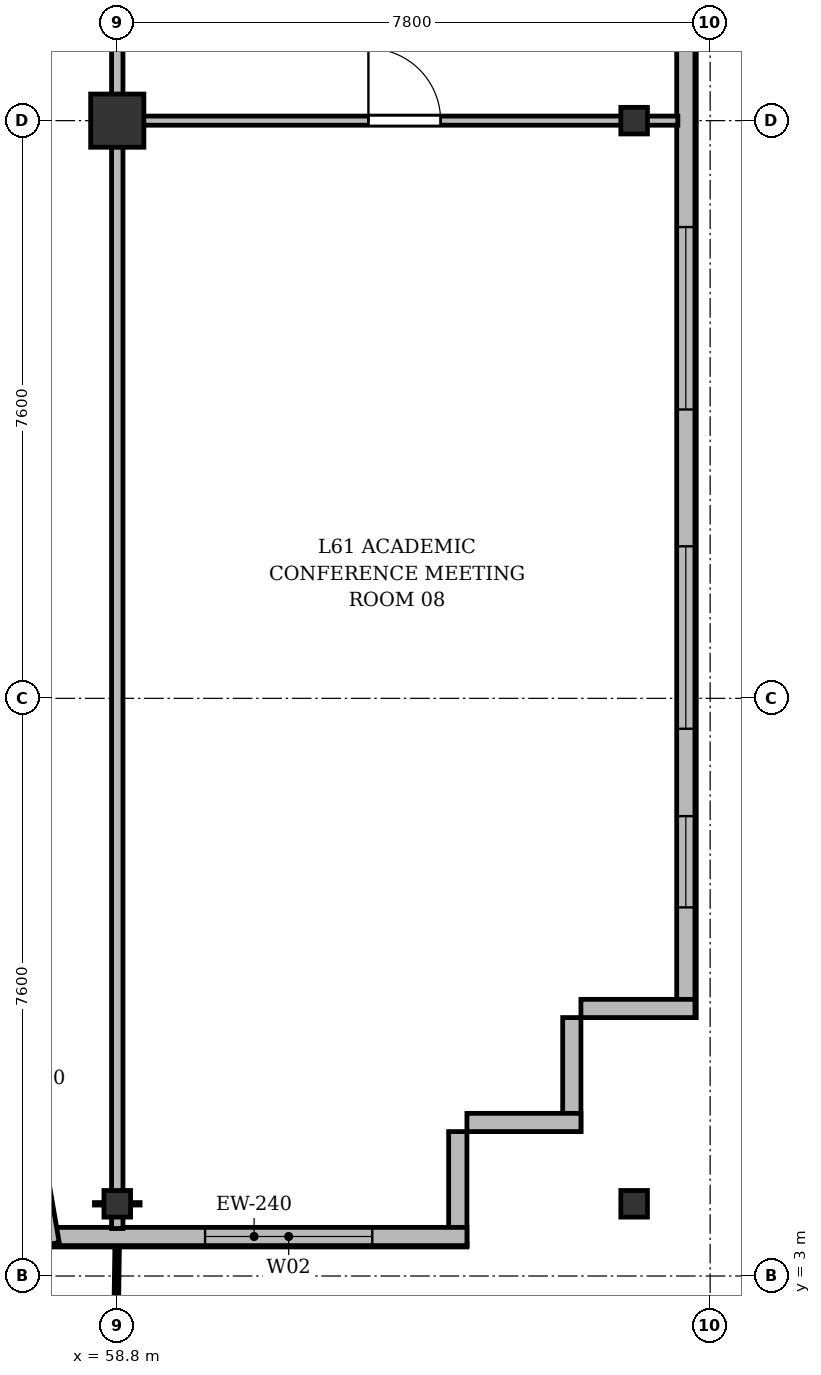
"""IFC4 building model, lengths in metres.
Left out: names, types, materials, properties, quantities, classifications, styles, units other than length and angle.
Written with IfcOpenShell. Run it as: python <this file> out.ifc"""

import sys

from ifc_helpers import new_model, si_unit, direction, frame, frame_2d, origin, origin_2d, place, context, subcontext, project, spatial, rectangle, i_section, extrude, source, transform, mapped, element, fill, save


model = new_model("IFC4")
c1 = context("Model", 3, precision=1e-05, world=origin(), true_north=direction((0.0, 1.0)))
c2 = subcontext(c1, "Body", "Model", "MODEL_VIEW")
j1 = project(units=[si_unit("LENGTHUNIT", "METRE"), si_unit("PLANEANGLEUNIT", "RADIAN")], contexts=[c1])
p1 = place(None, origin())
s1 = spatial("IfcSite", under=j1, at=p1, CompositionType="ELEMENT")
p2 = place(p1, origin())
s2 = spatial("IfcBuilding", under=s1, at=p2, CompositionType="ELEMENT")
p3 = place(p2, frame((0.0, 0.0, 233.7)))
s3 = spatial("IfcBuildingStorey", under=s2, at=p3, CompositionType="ELEMENT", Elevation=233.7)
m1 = source(origin(), c2, "Body", "SweptSolid", [
    extrude(i_section(OverallWidth=0.35, OverallDepth=0.35, WebThickness=0.018, FlangeThickness=0.028, at=origin_2d()), origin(), (0.0, 0.0, 1.0), 3.6),
])
p4 = place(p3, frame((58.8, 3.95, 0.0), z_axis=(0.0, 0.0, 1.0), x_axis=(1.0, 0.0, 0.0)))
e1 = element("IfcColumn", 1, at=p4, inside=s3, PredefinedType="COLUMN", context=c2, shape_type="MappedRepresentation", body=[
    mapped(m1, transform((0.0, 0.0, 0.0), x_axis=(1.0, 0.0, 0.0), y_axis=(0.0, 1.0, 0.0), z_axis=(0.0, 0.0, 1.0), scale=1.0)),
])
m2 = source(origin(), c2, "Body", "SweptSolid", [
    extrude(rectangle(XDim=0.7, YDim=0.7, at=origin_2d()), origin(), (0.0, 0.0, 1.0), 3.6),
])
p5 = place(p3, frame((58.8, 18.2, 0.0), z_axis=(0.0, 0.0, 1.0), x_axis=(1.0, 0.0, 0.0)))
e2 = element("IfcColumn", 2, at=p5, inside=s3, PredefinedType="COLUMN", context=c2, shape_type="MappedRepresentation", body=[
    mapped(m2, transform((0.0, 0.0, 0.0), x_axis=(1.0, 0.0, 0.0), y_axis=(0.0, 1.0, 0.0), z_axis=(0.0, 0.0, 1.0), scale=1.0)),
])
for number, where, z_axis, x_axis in (
    (3, (65.6, 3.95, 0.0), (0.0, 0.0, 1.0), (1.0, 0.0, 0.0)),
    (4, (65.6, 18.2, 0.0), (0.0, 0.0, 1.0), (1.0, 0.0, 0.0)),
):
    element("IfcColumn", number, at=place(p3, frame(where, z_axis=z_axis, x_axis=x_axis)), inside=s3, PredefinedType="COLUMN", context=c2, shape_type="MappedRepresentation", body=[
        mapped(m1, transform((0.0, 0.0, 0.0), x_axis=(1.0, 0.0, 0.0), y_axis=(0.0, 1.0, 0.0), z_axis=(0.0, 0.0, 1.0), scale=1.0)),
    ])
p6 = place(p3, frame((66.28, 45.5, 0.0), z_axis=(0.0, 0.0, 1.0), x_axis=(0.0, -1.0, 0.0)))
e5 = element("IfcWall", 5, at=p6, inside=s3, PredefinedType="SOLIDWALL", context=c2, shape_type="SweptSolid", body=[
    extrude(rectangle(XDim=39.1, YDim=0.24, at=frame_2d((19.55, 0.0))), origin(), (0.0, 0.0, 1.0), 3.36),
])
p7 = place(p6, frame((36.45, 0.0, 0.92)))
e6 = element("IfcOpeningElement", 6, at=p7, cuts=e5, PredefinedType="OPENING", context=c2, shape_type="SweptSolid", body=[
    extrude(rectangle(XDim=1.2, YDim=1.65, at=frame_2d((0.6, 0.825))), frame((0.0, 0.13, 0.0), z_axis=(0.0, -1.0, 0.0), x_axis=(1.0, 0.0, 0.0)), (0.0, 0.0, 1.0), 0.26),
])
p8 = place(p6, frame((32.9, 0.0, 0.92)))
e7 = element("IfcOpeningElement", 7, at=p8, cuts=e5, PredefinedType="OPENING", context=c2, shape_type="SweptSolid", body=[
    extrude(rectangle(XDim=2.4, YDim=2.1, at=frame_2d((1.2, 1.05))), frame((0.0, 0.13, 0.0), z_axis=(0.0, -1.0, 0.0), x_axis=(1.0, 0.0, 0.0)), (0.0, 0.0, 1.0), 0.26),
])
p9 = place(p6, frame((28.7, 0.0, 0.92)))
e8 = element("IfcOpeningElement", 8, at=p9, cuts=e5, PredefinedType="OPENING", context=c2, shape_type="SweptSolid", body=[
    extrude(rectangle(XDim=2.4, YDim=2.1, at=frame_2d((1.2, 1.05))), frame((0.0, 0.13, 0.0), z_axis=(0.0, -1.0, 0.0), x_axis=(1.0, 0.0, 0.0)), (0.0, 0.0, 1.0), 0.26),
])
p10 = place(p6, frame((21.5, 0.0, 0.92)))
e9 = element("IfcOpeningElement", 9, at=p10, cuts=e5, PredefinedType="OPENING", context=c2, shape_type="SweptSolid", body=[
    extrude(rectangle(XDim=2.4, YDim=2.1, at=frame_2d((1.2, 1.05))), frame((0.0, 0.13, 0.0), z_axis=(0.0, -1.0, 0.0), x_axis=(1.0, 0.0, 0.0)), (0.0, 0.0, 1.0), 0.26),
])
p11 = place(p6, frame((7.5, 0.0, 0.92)))
e10 = element("IfcOpeningElement", 10, at=p11, cuts=e5, PredefinedType="OPENING", context=c2, shape_type="SweptSolid", body=[
    extrude(rectangle(XDim=2.4, YDim=2.1, at=frame_2d((1.2, 1.05))), frame((0.0, 0.13, 0.0), z_axis=(0.0, -1.0, 0.0), x_axis=(1.0, 0.0, 0.0)), (0.0, 0.0, 1.0), 0.26),
])
p12 = place(p6, frame((4.5, 0.0, 0.92)))
e11 = element("IfcOpeningElement", 11, at=p12, cuts=e5, PredefinedType="OPENING", context=c2, shape_type="SweptSolid", body=[
    extrude(rectangle(XDim=1.2, YDim=1.65, at=frame_2d((0.6, 0.825))), frame((0.0, 0.13, 0.0), z_axis=(0.0, -1.0, 0.0), x_axis=(1.0, 0.0, 0.0)), (0.0, 0.0, 1.0), 0.26),
])
p13 = place(p6, frame((1.15, 0.0, 0.92)))
e12 = element("IfcOpeningElement", 12, at=p13, cuts=e5, PredefinedType="OPENING", context=c2, shape_type="SweptSolid", body=[
    extrude(rectangle(XDim=1.2, YDim=1.65, at=frame_2d((0.6, 0.825))), frame((0.0, 0.13, 0.0), z_axis=(0.0, -1.0, 0.0), x_axis=(1.0, 0.0, 0.0)), (0.0, 0.0, 1.0), 0.26),
])
p14 = place(p3, frame((66.4, 6.52, 0.0), z_axis=(0.0, 0.0, 1.0), x_axis=(-1.0, 0.0, 0.0)))
e13 = element("IfcWall", 13, at=p14, inside=s3, PredefinedType="SOLIDWALL", context=c2, shape_type="SweptSolid", body=[
    extrude(rectangle(XDim=1.5, YDim=0.24, at=frame_2d((0.75, 0.0))), origin(), (0.0, 0.0, 1.0), 2.86),
])
for number, where, z_axis, x_axis in (
    (14, (64.78, 6.4, 0.0), (0.0, 0.0, 1.0), (0.0, -1.0, 0.0)),
    (15, (64.9, 5.02, 0.0), (0.0, 0.0, 1.0), (-1.0, 0.0, 0.0)),
):
    element("IfcWall", number, at=place(p3, frame(where, z_axis=z_axis, x_axis=x_axis)), inside=s3, PredefinedType="SOLIDWALL", context=c2, shape_type="SweptSolid", body=[
        extrude(rectangle(XDim=1.5, YDim=0.24, at=frame_2d((0.75, 0.0))), origin(), (0.0, 0.0, 1.0), 3.36),
    ])
p15 = place(p3, frame((63.28, 4.9, 0.0), z_axis=(0.0, 0.0, 1.0), x_axis=(0.0, -1.0, 0.0)))
e16 = element("IfcWall", 16, at=p15, inside=s3, PredefinedType="SOLIDWALL", context=c2, shape_type="SweptSolid", body=[
    extrude(rectangle(XDim=1.5, YDim=0.24, at=frame_2d((0.75, 0.0))), origin(), (0.0, 0.0, 1.0), 2.91),
])
p16 = place(p3, frame((63.4, 3.52, 0.0), z_axis=(0.0, 0.0, 1.0), x_axis=(-1.0, 0.0, 0.0)))
e17 = element("IfcWall", 17, at=p16, inside=s3, PredefinedType="SOLIDWALL", context=c2, shape_type="SweptSolid", body=[
    extrude(rectangle(XDim=5.6, YDim=0.24, at=frame_2d((2.8, 0.0))), origin(), (0.0, 0.0, 1.0), 3.36),
])
p17 = place(p16, frame((1.245, 0.0, 0.9)))
e18 = element("IfcOpeningElement", 18, at=p17, cuts=e17, PredefinedType="OPENING", context=c2, shape_type="SweptSolid", body=[
    extrude(rectangle(XDim=2.2, YDim=1.8, at=frame_2d((1.1, 0.9))), frame((0.0, 0.13, 0.0), z_axis=(0.0, -1.0, 0.0), x_axis=(1.0, 0.0, 0.0)), (0.0, 0.0, 1.0), 0.26),
])
p18 = place(p3, frame((57.918, 3.42, 0.0), z_axis=(0.0, 0.0, 1.0), x_axis=(-0.168923741424, 0.98562912375, 0.0)))
e19 = element("IfcWall", 19, at=p18, inside=s3, PredefinedType="SOLIDWALL", context=c2, shape_type="SweptSolid", body=[
    extrude(rectangle(XDim=3.551, YDim=0.24, at=frame_2d((1.775, 0.0))), origin(), (0.0, 0.0, 1.0), 2.91),
])
p19 = place(p3, frame((58.8, 3.625, 0.0), z_axis=(0.0, 0.0, 1.0), x_axis=(0.0, 1.0, 0.0)))
e20 = element("IfcWall", 20, at=p19, inside=s3, PredefinedType="PARTITIONING", context=c2, shape_type="SweptSolid", body=[
    extrude(rectangle(XDim=27.375, YDim=0.15, at=frame_2d((13.688, 0.0))), origin(), (0.0, 0.0, 1.0), 2.86),
])
p20 = place(p3, frame((58.8, 18.2, 0.0), z_axis=(0.0, 0.0, 1.0), x_axis=(1.0, 0.0, 0.0)))
e21 = element("IfcWall", 21, at=p20, inside=s3, PredefinedType="PARTITIONING", context=c2, shape_type="SweptSolid", body=[
    extrude(rectangle(XDim=7.375, YDim=0.12, at=frame_2d((3.688, 0.0))), origin(), (0.0, 0.0, 1.0), 2.91),
])
p21 = place(p20, frame((3.304, 0.0, 0.0)))
e22 = element("IfcOpeningElement", 22, at=p21, cuts=e21, PredefinedType="OPENING", context=c2, shape_type="SweptSolid", body=[
    extrude(rectangle(XDim=0.95, YDim=2.15, at=frame_2d((0.475, 1.075))), frame((0.0, 0.07, 0.0), z_axis=(0.0, -1.0, 0.0), x_axis=(1.0, 0.0, 0.0)), (0.0, 0.0, 1.0), 0.14),
])
m3 = source(origin(), c2, "Body", "SweptSolid", [
    extrude(rectangle(XDim=1.2, YDim=1.65, at=frame_2d((0.6, 0.825))), frame((0.0, 0.03, 0.0), z_axis=(0.0, -1.0, 0.0), x_axis=(1.0, 0.0, 0.0)), (0.0, 0.0, 1.0), 0.06),
])
p22 = place(p7, origin())
e23 = element("IfcWindow", 23, at=p22, inside=s3, PartitioningType="SINGLE_PANEL", PredefinedType="WINDOW", context=c2, shape_type="MappedRepresentation", body=[
    mapped(m3, transform((0.0, 0.0, 0.0), x_axis=(1.0, 0.0, 0.0), y_axis=(0.0, 1.0, 0.0), z_axis=(0.0, 0.0, 1.0), scale=1.0)),
])
fill(e6, e23)
m4 = source(origin(), c2, "Body", "SweptSolid", [
    extrude(rectangle(XDim=2.4, YDim=2.1, at=frame_2d((1.2, 1.05))), frame((0.0, 0.03, 0.0), z_axis=(0.0, -1.0, 0.0), x_axis=(1.0, 0.0, 0.0)), (0.0, 0.0, 1.0), 0.06),
])
p23 = place(p8, origin())
e24 = element("IfcWindow", 24, at=p23, inside=s3, PartitioningType="SINGLE_PANEL", PredefinedType="WINDOW", context=c2, shape_type="MappedRepresentation", body=[
    mapped(m4, transform((0.0, 0.0, 0.0), x_axis=(1.0, 0.0, 0.0), y_axis=(0.0, 1.0, 0.0), z_axis=(0.0, 0.0, 1.0), scale=1.0)),
])
fill(e7, e24)
p24 = place(p9, origin())
e25 = element("IfcWindow", 25, at=p24, inside=s3, PartitioningType="SINGLE_PANEL", PredefinedType="WINDOW", context=c2, shape_type="MappedRepresentation", body=[
    mapped(m4, transform((0.0, 0.0, 0.0), x_axis=(1.0, 0.0, 0.0), y_axis=(0.0, 1.0, 0.0), z_axis=(0.0, 0.0, 1.0), scale=1.0)),
])
fill(e8, e25)
m5 = source(origin(), c2, "Body", "SweptSolid", [
    extrude(rectangle(XDim=2.2, YDim=1.8, at=frame_2d((1.1, 0.9))), frame((0.0, 0.03, 0.0), z_axis=(0.0, -1.0, 0.0), x_axis=(1.0, 0.0, 0.0)), (0.0, 0.0, 1.0), 0.06),
])
p25 = place(p17, origin())
e26 = element("IfcWindow", 26, at=p25, inside=s3, PartitioningType="SINGLE_PANEL", PredefinedType="WINDOW", context=c2, shape_type="MappedRepresentation", body=[
    mapped(m5, transform((0.0, 0.0, 0.0), x_axis=(1.0, 0.0, 0.0), y_axis=(0.0, 1.0, 0.0), z_axis=(0.0, 0.0, 1.0), scale=1.0)),
])
fill(e18, e26)
m6 = source(origin(), c2, "Body", "SweptSolid", [
    extrude(rectangle(XDim=0.95, YDim=2.15, at=frame_2d((0.475, 1.075))), frame((0.0, 0.025, 0.0), z_axis=(0.0, -1.0, 0.0), x_axis=(1.0, 0.0, 0.0)), (0.0, 0.0, 1.0), 0.05),
])
p26 = place(p21, origin())
e27 = element("IfcDoor", 27, at=p26, inside=s3, OperationType="SINGLE_SWING_LEFT", PredefinedType="DOOR", context=c2, shape_type="MappedRepresentation", body=[
    mapped(m6, transform((0.0, 0.0, 0.0), x_axis=(1.0, 0.0, 0.0), y_axis=(0.0, 1.0, 0.0), z_axis=(0.0, 0.0, 1.0), scale=1.0)),
])
fill(e22, e27)
save(model, sys.argv[1])
